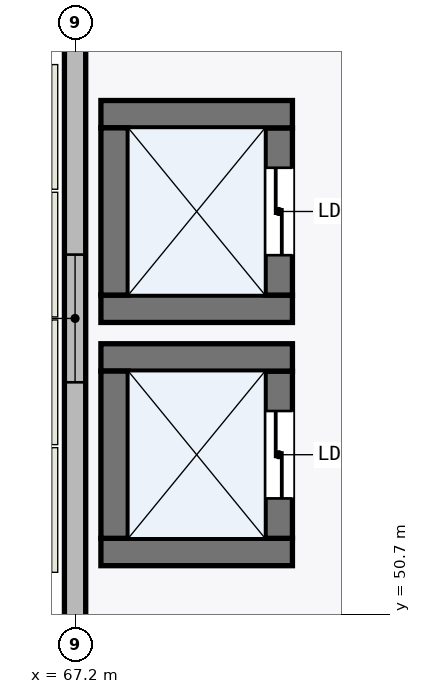
"""IFC4 building model, lengths in metres.
Left out: names, types, materials, properties, quantities, classifications, styles, units other than length and angle.
Written with IfcOpenShell. Run it as: python <this file> out.ifc"""

import sys

from ifc_helpers import new_model, si_unit, direction, frame, frame_2d, origin, place, context, subcontext, project, spatial, rectangle, extrude, element, fill, save


model = new_model("IFC4")
c1 = context("Model", 3, precision=1e-05, world=origin(), true_north=direction((0.0, 1.0)))
c2 = subcontext(c1, "Body", "Model", "MODEL_VIEW")
j1 = project(units=[si_unit("LENGTHUNIT", "METRE"), si_unit("PLANEANGLEUNIT", "RADIAN")], contexts=[c1])
p1 = place(None, origin())
s1 = spatial("IfcSite", under=j1, at=p1, CompositionType="ELEMENT")
p2 = place(p1, origin())
s2 = spatial("IfcBuilding", under=s1, at=p2, CompositionType="ELEMENT")
p3 = place(p2, frame((0.0, 0.0, 6.0)))
s3 = spatial("IfcBuildingStorey", under=s2, at=p3, CompositionType="ELEMENT", Elevation=6.0)
p4 = place(p3, frame((67.2, 58.602, 0.0), z_axis=(0.0, 0.0, 1.0), x_axis=(0.0, -1.0, 0.0)))
e1 = element("IfcWall", 1, at=p4, inside=s3, PredefinedType="STANDARD", context=c2, shape_type="SweptSolid", body=[
    extrude(rectangle(XDim=8.019, YDim=0.28, at=frame_2d((4.009, 0.0))), origin(), (0.0, 0.0, 1.0), 4.631),
])
p5 = place(p4, frame((3.169, 0.0, 0.95)))
e2 = element("IfcOpeningElement", 2, at=p5, cuts=e1, PredefinedType="OPENING", context=c2, shape_type="SweptSolid", body=[
    extrude(rectangle(XDim=1.68, YDim=1.8, at=frame_2d((0.84, 0.9))), frame((0.0, 0.15, 0.0), z_axis=(0.0, -1.0, 0.0), x_axis=(1.0, 0.0, 0.0)), (0.0, 0.0, 1.0), 0.3),
])
p6 = place(p3, frame((67.54, 51.52, 0.0), z_axis=(0.0, 0.0, 1.0), x_axis=(1.0, 0.0, 0.0)))
e3 = element("IfcWall", 3, at=p6, inside=s3, PredefinedType="SHEAR", context=c2, shape_type="SweptSolid", body=[
    extrude(rectangle(XDim=2.52, YDim=0.36, at=frame_2d((1.26, 0.0))), origin(), (0.0, 0.0, 1.0), 5.145),
])
p7 = place(p3, frame((69.88, 51.7, 0.0), z_axis=(0.0, 0.0, 1.0), x_axis=(0.0, 1.0, 0.0)))
e4 = element("IfcWall", 4, at=p7, inside=s3, PredefinedType="SHEAR", context=c2, shape_type="SweptSolid", body=[
    extrude(rectangle(XDim=2.2, YDim=0.36, at=frame_2d((1.1, 0.0))), origin(), (0.0, 0.0, 1.0), 5.145),
])
p8 = place(p7, frame((0.525, 0.0, 0.0)))
e5 = element("IfcOpeningElement", 5, at=p8, cuts=e4, PredefinedType="OPENING", context=c2, shape_type="SweptSolid", body=[
    extrude(rectangle(XDim=1.15, YDim=2.2, at=frame_2d((0.575, 1.1))), frame((0.0, 0.19, 0.0), z_axis=(0.0, -1.0, 0.0), x_axis=(1.0, 0.0, 0.0)), (0.0, 0.0, 1.0), 0.38),
])
p9 = place(p3, frame((70.06, 54.08, 0.0), z_axis=(0.0, 0.0, 1.0), x_axis=(-1.0, 0.0, 0.0)))
e6 = element("IfcWall", 6, at=p9, inside=s3, PredefinedType="SHEAR", context=c2, shape_type="SweptSolid", body=[
    extrude(rectangle(XDim=2.52, YDim=0.36, at=frame_2d((1.26, 0.0))), origin(), (0.0, 0.0, 1.0), 5.145),
])
p10 = place(p3, frame((67.72, 53.9, 0.0), z_axis=(0.0, 0.0, 1.0), x_axis=(0.0, -1.0, 0.0)))
e7 = element("IfcWall", 7, at=p10, inside=s3, PredefinedType="SHEAR", context=c2, shape_type="SweptSolid", body=[
    extrude(rectangle(XDim=2.2, YDim=0.36, at=frame_2d((1.1, 0.0))), origin(), (0.0, 0.0, 1.0), 5.145),
])
p11 = place(p3, frame((67.54, 54.72, 0.0), z_axis=(0.0, 0.0, 1.0), x_axis=(1.0, 0.0, 0.0)))
e8 = element("IfcWall", 8, at=p11, inside=s3, PredefinedType="SHEAR", context=c2, shape_type="SweptSolid", body=[
    extrude(rectangle(XDim=2.52, YDim=0.36, at=frame_2d((1.26, 0.0))), origin(), (0.0, 0.0, 1.0), 5.145),
])
p12 = place(p3, frame((69.88, 54.9, 0.0), z_axis=(0.0, 0.0, 1.0), x_axis=(0.0, 1.0, 0.0)))
e9 = element("IfcWall", 9, at=p12, inside=s3, PredefinedType="SHEAR", context=c2, shape_type="SweptSolid", body=[
    extrude(rectangle(XDim=2.2, YDim=0.36, at=frame_2d((1.1, 0.0))), origin(), (0.0, 0.0, 1.0), 5.145),
])
p13 = place(p12, frame((0.525, 0.0, 0.0)))
e10 = element("IfcOpeningElement", 10, at=p13, cuts=e9, PredefinedType="OPENING", context=c2, shape_type="SweptSolid", body=[
    extrude(rectangle(XDim=1.15, YDim=2.2, at=frame_2d((0.575, 1.1))), frame((0.0, 0.19, 0.0), z_axis=(0.0, -1.0, 0.0), x_axis=(1.0, 0.0, 0.0)), (0.0, 0.0, 1.0), 0.38),
])
p14 = place(p3, frame((70.06, 57.28, 0.0), z_axis=(0.0, 0.0, 1.0), x_axis=(-1.0, 0.0, 0.0)))
e11 = element("IfcWall", 11, at=p14, inside=s3, PredefinedType="SHEAR", context=c2, shape_type="SweptSolid", body=[
    extrude(rectangle(XDim=2.52, YDim=0.36, at=frame_2d((1.26, 0.0))), origin(), (0.0, 0.0, 1.0), 5.145),
])
p15 = place(p3, frame((67.72, 57.1, 0.0), z_axis=(0.0, 0.0, 1.0), x_axis=(0.0, -1.0, 0.0)))
e12 = element("IfcWall", 12, at=p15, inside=s3, PredefinedType="SHEAR", context=c2, shape_type="SweptSolid", body=[
    extrude(rectangle(XDim=2.2, YDim=0.36, at=frame_2d((1.1, 0.0))), origin(), (0.0, 0.0, 1.0), 5.145),
])
p16 = place(p5, origin())
e13 = element("IfcWindow", 13, at=p16, inside=s3, PartitioningType="SINGLE_PANEL", PredefinedType="WINDOW", context=c2, shape_type="SweptSolid", body=[
    extrude(rectangle(XDim=1.68, YDim=1.8, at=frame_2d((0.84, 0.9))), frame((0.0, 0.03, 0.0), z_axis=(0.0, -1.0, 0.0), x_axis=(1.0, 0.0, 0.0)), (0.0, 0.0, 1.0), 0.06),
])
fill(e2, e13)
p17 = place(p8, frame((1.15, 0.0, 0.0), z_axis=(0.0, 0.0, 1.0), x_axis=(-1.0, 0.0, 0.0)))
e14 = element("IfcDoor", 14, at=p17, inside=s3, OperationType="DOUBLE_DOOR_SLIDING", PredefinedType="DOOR", context=c2, shape_type="SweptSolid", body=[
    extrude(rectangle(XDim=1.15, YDim=2.2, at=frame_2d((0.575, 1.1))), frame((0.0, 0.025, 0.0), z_axis=(0.0, -1.0, 0.0), x_axis=(1.0, 0.0, 0.0)), (0.0, 0.0, 1.0), 0.05),
])
fill(e5, e14)
p18 = place(p13, frame((1.15, 0.0, 0.0), z_axis=(0.0, 0.0, 1.0), x_axis=(-1.0, 0.0, 0.0)))
e15 = element("IfcDoor", 15, at=p18, inside=s3, OperationType="DOUBLE_DOOR_SLIDING", PredefinedType="DOOR", context=c2, shape_type="SweptSolid", body=[
    extrude(rectangle(XDim=1.15, YDim=2.2, at=frame_2d((0.575, 1.1))), frame((0.0, 0.025, 0.0), z_axis=(0.0, -1.0, 0.0), x_axis=(1.0, 0.0, 0.0)), (0.0, 0.0, 1.0), 0.05),
])
fill(e10, e15)
save(model, sys.argv[1])
